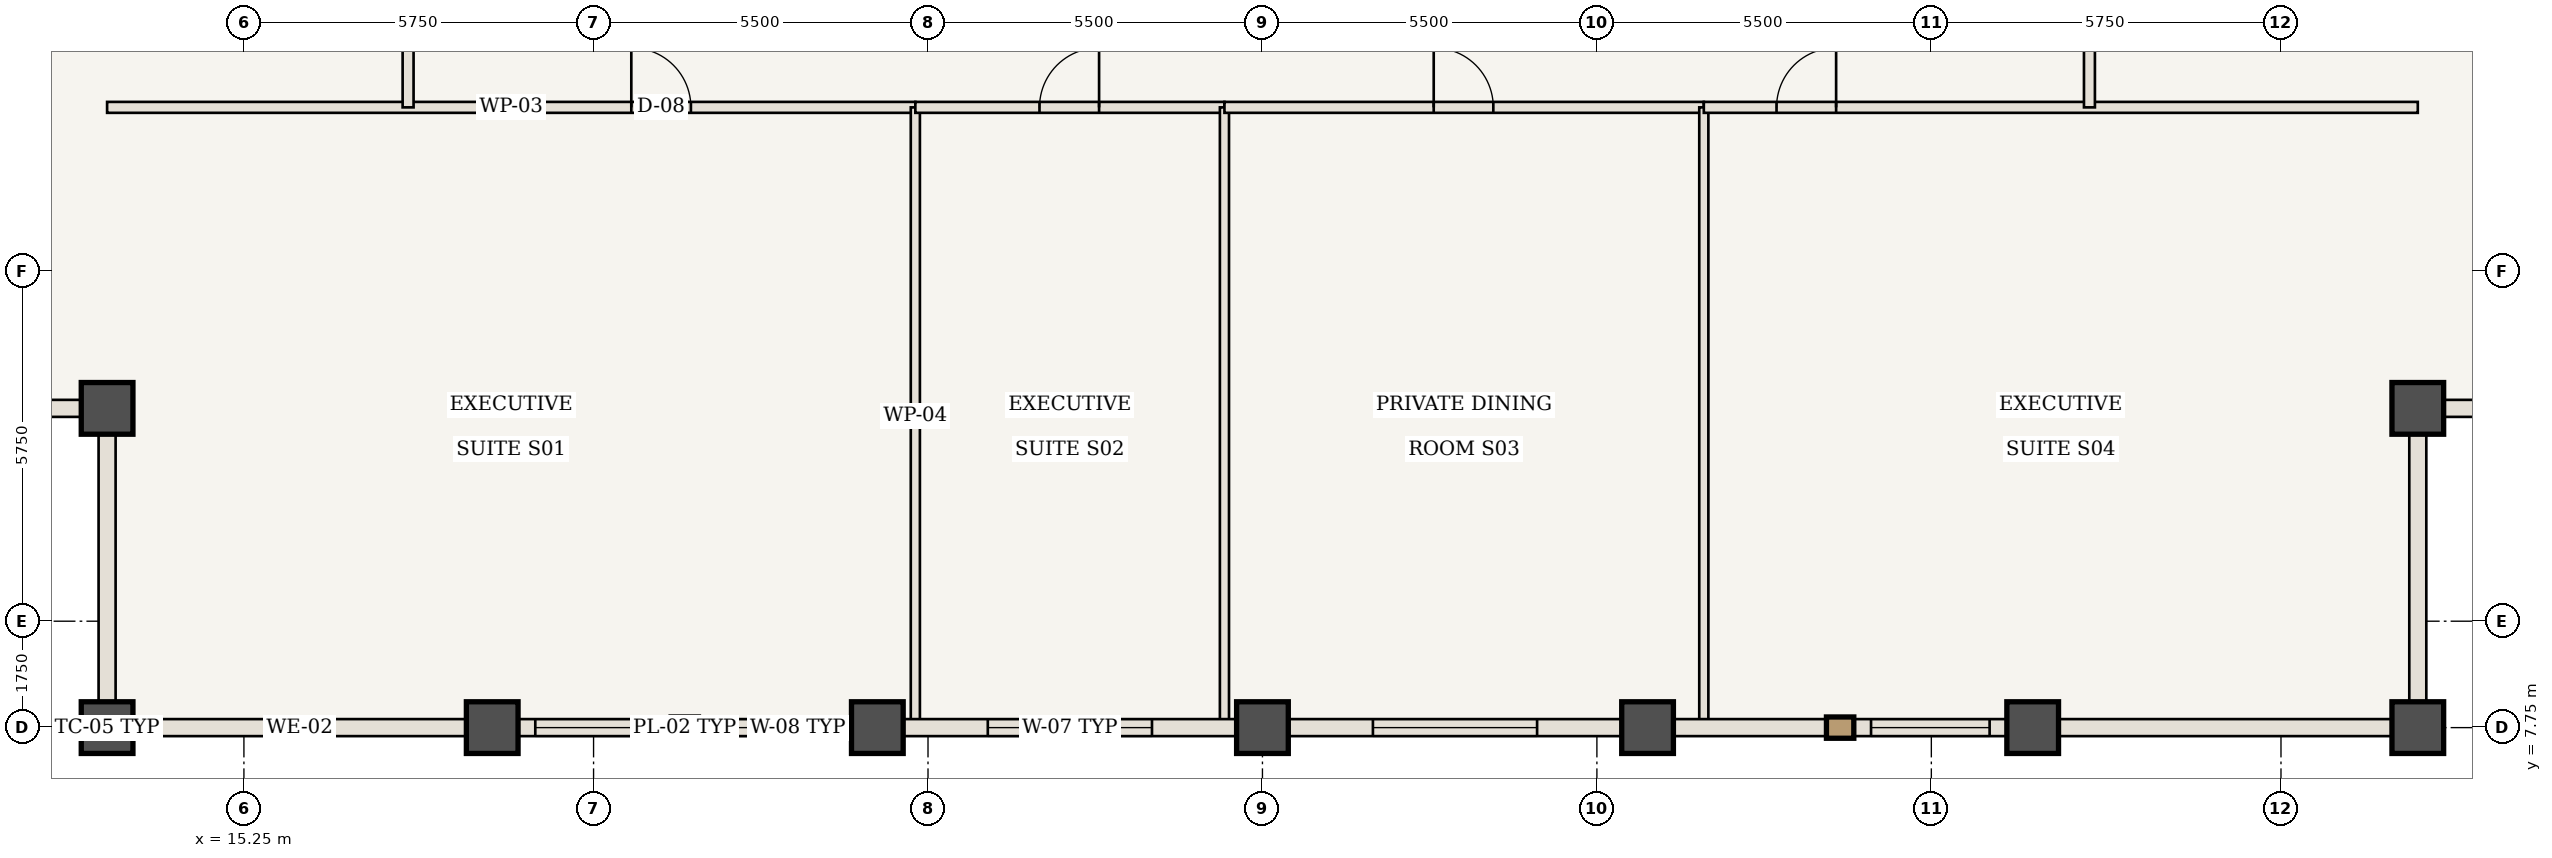
"""IFC4 building model, lengths in metres.
Left out: names, types, materials, properties, quantities, classifications, styles, units other than length and angle.
Written with IfcOpenShell. Run it as: python <this file> out.ifc"""

import sys

from ifc_helpers import new_model, si_unit, direction, frame, frame_2d, origin, origin_2d, place, context, subcontext, project, spatial, rectangle, extrude, element, fill, save


model = new_model("IFC4")
c1 = context("Model", 3, precision=1e-05, world=origin(), true_north=direction((0.0, 1.0)))
c2 = subcontext(c1, "Body", "Model", "MODEL_VIEW")
j1 = project(units=[si_unit("LENGTHUNIT", "METRE"), si_unit("PLANEANGLEUNIT", "RADIAN")], contexts=[c1])
p1 = place(None, origin())
s1 = spatial("IfcSite", under=j1, at=p1, CompositionType="ELEMENT")
p2 = place(p1, origin())
s2 = spatial("IfcBuilding", under=s1, at=p2, CompositionType="ELEMENT")
p3 = place(p2, frame((0.0, 0.0, 221.55)))
s3 = spatial("IfcBuildingStorey", under=s2, at=p3, CompositionType="ELEMENT", Elevation=221.55)
for number, where, z_axis, x_axis in (
    (1, (13.0, 7.75, 0.0), (0.0, 0.0, 1.0), (1.0, 0.0, 0.0)),
    (2, (13.0, 13.0, 0.0), (0.0, 0.0, 1.0), (1.0, 0.0, 0.0)),
    (3, (51.0, 7.75, 0.0), (0.0, 0.0, 1.0), (1.0, 0.0, 0.0)),
    (4, (51.0, 13.0, 0.0), (0.0, 0.0, 1.0), (1.0, 0.0, 0.0)),
    (5, (19.333, 7.75, 0.0), (0.0, 0.0, 1.0), (1.0, 0.0, 0.0)),
    (6, (25.667, 7.75, 0.0), (0.0, 0.0, 1.0), (1.0, 0.0, 0.0)),
    (7, (32.0, 7.75, 0.0), (0.0, 0.0, 1.0), (1.0, 0.0, 0.0)),
    (8, (38.333, 7.75, 0.0), (0.0, 0.0, 1.0), (1.0, 0.0, 0.0)),
    (9, (44.667, 7.75, 0.0), (0.0, 0.0, 1.0), (1.0, 0.0, 0.0)),
):
    element("IfcColumn", number, at=place(p3, frame(where, z_axis=z_axis, x_axis=x_axis)), inside=s3, PredefinedType="COLUMN", context=c2, shape_type="SweptSolid", body=[
        extrude(rectangle(XDim=0.85, YDim=0.85, at=origin_2d()), origin(), (0.0, 0.0, 1.0), 3.85),
    ])
p4 = place(p3, frame((13.0, 17.95, 0.0), z_axis=(0.0, 0.0, 1.0), x_axis=(1.0, 0.0, 0.0)))
e10 = element("IfcWall", 10, at=p4, inside=s3, PredefinedType="STANDARD", context=c2, shape_type="SweptSolid", body=[
    extrude(rectangle(XDim=13.292, YDim=0.18, at=frame_2d((6.646, 0.0))), origin(), (0.0, 0.0, 1.0), 3.685),
])
p5 = place(p4, frame((8.621, 0.0, 0.0)))
e11 = element("IfcOpeningElement", 11, at=p5, cuts=e10, PredefinedType="OPENING", context=c2, shape_type="SweptSolid", body=[
    extrude(rectangle(XDim=0.98, YDim=2.2, at=frame_2d((0.49, 1.1))), frame((0.0, 0.1, 0.0), z_axis=(0.0, -1.0, 0.0), x_axis=(1.0, 0.0, 0.0)), (0.0, 0.0, 1.0), 0.2),
])
p6 = place(p3, frame((26.292, 7.81, 0.0), z_axis=(0.0, 0.0, 1.0), x_axis=(0.0, 1.0, 0.0)))
e12 = element("IfcWall", 12, at=p6, inside=s3, PredefinedType="STANDARD", context=c2, shape_type="SweptSolid", body=[
    extrude(rectangle(XDim=10.14, YDim=0.15, at=frame_2d((5.07, 0.0))), origin(), (0.0, 0.0, 1.0), 3.685),
])
p7 = place(p3, frame((26.292, 17.95, 0.0), z_axis=(0.0, 0.0, 1.0), x_axis=(1.0, 0.0, 0.0)))
e13 = element("IfcWall", 13, at=p7, inside=s3, PredefinedType="STANDARD", context=c2, shape_type="SweptSolid", body=[
    extrude(rectangle(XDim=5.083, YDim=0.18, at=frame_2d((2.542, 0.0))), origin(), (0.0, 0.0, 1.0), 3.685),
])
p8 = place(p7, frame((2.042, 0.0, 0.0)))
e14 = element("IfcOpeningElement", 14, at=p8, cuts=e13, PredefinedType="OPENING", context=c2, shape_type="SweptSolid", body=[
    extrude(rectangle(XDim=0.98, YDim=2.2, at=frame_2d((0.49, 1.1))), frame((0.0, 0.1, 0.0), z_axis=(0.0, -1.0, 0.0), x_axis=(1.0, 0.0, 0.0)), (0.0, 0.0, 1.0), 0.2),
])
p9 = place(p3, frame((31.375, 7.81, 0.0), z_axis=(0.0, 0.0, 1.0), x_axis=(0.0, 1.0, 0.0)))
e15 = element("IfcWall", 15, at=p9, inside=s3, PredefinedType="STANDARD", context=c2, shape_type="SweptSolid", body=[
    extrude(rectangle(XDim=10.14, YDim=0.15, at=frame_2d((5.07, 0.0))), origin(), (0.0, 0.0, 1.0), 3.685),
])
p10 = place(p3, frame((31.375, 17.95, 0.0), z_axis=(0.0, 0.0, 1.0), x_axis=(1.0, 0.0, 0.0)))
e16 = element("IfcWall", 16, at=p10, inside=s3, PredefinedType="STANDARD", context=c2, shape_type="SweptSolid", body=[
    extrude(rectangle(XDim=7.883, YDim=0.18, at=frame_2d((3.942, 0.0))), origin(), (0.0, 0.0, 1.0), 3.685),
])
p11 = place(p10, frame((3.442, 0.0, 0.0)))
e17 = element("IfcOpeningElement", 17, at=p11, cuts=e16, PredefinedType="OPENING", context=c2, shape_type="SweptSolid", body=[
    extrude(rectangle(XDim=0.98, YDim=2.2, at=frame_2d((0.49, 1.1))), frame((0.0, 0.1, 0.0), z_axis=(0.0, -1.0, 0.0), x_axis=(1.0, 0.0, 0.0)), (0.0, 0.0, 1.0), 0.2),
])
p12 = place(p3, frame((39.258, 7.81, 0.0), z_axis=(0.0, 0.0, 1.0), x_axis=(0.0, 1.0, 0.0)))
e18 = element("IfcWall", 18, at=p12, inside=s3, PredefinedType="STANDARD", context=c2, shape_type="SweptSolid", body=[
    extrude(rectangle(XDim=10.14, YDim=0.15, at=frame_2d((5.07, 0.0))), origin(), (0.0, 0.0, 1.0), 3.685),
])
p13 = place(p3, frame((39.258, 17.95, 0.0), z_axis=(0.0, 0.0, 1.0), x_axis=(1.0, 0.0, 0.0)))
e19 = element("IfcWall", 19, at=p13, inside=s3, PredefinedType="STANDARD", context=c2, shape_type="SweptSolid", body=[
    extrude(rectangle(XDim=11.742, YDim=0.18, at=frame_2d((5.871, 0.0))), origin(), (0.0, 0.0, 1.0), 3.685),
])
p14 = place(p13, frame((1.196, 0.0, 0.0)))
e20 = element("IfcOpeningElement", 20, at=p14, cuts=e19, PredefinedType="OPENING", context=c2, shape_type="SweptSolid", body=[
    extrude(rectangle(XDim=0.98, YDim=2.2, at=frame_2d((0.49, 1.1))), frame((0.0, 0.1, 0.0), z_axis=(0.0, -1.0, 0.0), x_axis=(1.0, 0.0, 0.0)), (0.0, 0.0, 1.0), 0.2),
])
p15 = place(p3, frame((17.95, 17.95, 0.0), z_axis=(0.0, 0.0, 1.0), x_axis=(0.0, 1.0, 0.0)))
e21 = element("IfcWall", 21, at=p15, inside=s3, PredefinedType="STANDARD", context=c2, shape_type="SweptSolid", body=[
    extrude(rectangle(XDim=6.642, YDim=0.18, at=frame_2d((3.321, 0.0))), origin(), (0.0, 0.0, 1.0), 3.685),
])
p16 = place(p15, frame((4.271, 0.0, 0.0)))
e22 = element("IfcOpeningElement", 22, at=p16, cuts=e21, PredefinedType="OPENING", context=c2, shape_type="SweptSolid", body=[
    extrude(rectangle(XDim=0.98, YDim=2.2, at=frame_2d((0.49, 1.1))), frame((0.0, 0.1, 0.0), z_axis=(0.0, -1.0, 0.0), x_axis=(1.0, 0.0, 0.0)), (0.0, 0.0, 1.0), 0.2),
])
p17 = place(p3, frame((45.6, 17.95, 0.0), z_axis=(0.0, 0.0, 1.0), x_axis=(0.0, 1.0, 0.0)))
e23 = element("IfcWall", 23, at=p17, inside=s3, PredefinedType="STANDARD", context=c2, shape_type="SweptSolid", body=[
    extrude(rectangle(XDim=13.1, YDim=0.18, at=frame_2d((6.55, 0.0))), origin(), (0.0, 0.0, 1.0), 3.685),
])
p18 = place(p17, frame((6.05, 0.0, 0.0)))
e24 = element("IfcOpeningElement", 24, at=p18, cuts=e23, PredefinedType="OPENING", context=c2, shape_type="SweptSolid", body=[
    extrude(rectangle(XDim=0.98, YDim=2.2, at=frame_2d((0.49, 1.1))), frame((0.0, 0.1, 0.0), z_axis=(0.0, -1.0, 0.0), x_axis=(1.0, 0.0, 0.0)), (0.0, 0.0, 1.0), 0.2),
])
p19 = place(p3, frame((19.333, 7.75, 0.0), z_axis=(0.0, 0.0, 1.0), x_axis=(-1.0, 0.0, 0.0)))
e25 = element("IfcWall", 25, at=p19, inside=s3, PredefinedType="USERDEFINED", context=c2, shape_type="SweptSolid", body=[
    extrude(rectangle(XDim=6.333, YDim=0.28, at=frame_2d((3.167, 0.0))), origin(), (0.0, 0.0, 1.0), 2.985),
])
p20 = place(p3, frame((25.667, 7.75, 0.0), z_axis=(0.0, 0.0, 1.0), x_axis=(-1.0, 0.0, 0.0)))
e26 = element("IfcWall", 26, at=p20, inside=s3, PredefinedType="USERDEFINED", context=c2, shape_type="SweptSolid", body=[
    extrude(rectangle(XDim=6.333, YDim=0.28, at=frame_2d((3.167, 0.0))), origin(), (0.0, 0.0, 1.0), 2.985),
])
p21 = place(p20, frame((0.708, 0.0, 0.85)))
e27 = element("IfcOpeningElement", 27, at=p21, cuts=e26, PredefinedType="OPENING", context=c2, shape_type="SweptSolid", body=[
    extrude(rectangle(XDim=1.95, YDim=1.935, at=frame_2d((0.975, 0.968))), frame((0.0, 0.15, 0.0), z_axis=(0.0, -1.0, 0.0), x_axis=(1.0, 0.0, 0.0)), (0.0, 0.0, 1.0), 0.3),
])
p22 = place(p20, frame((3.675, 0.0, 0.85)))
e28 = element("IfcOpeningElement", 28, at=p22, cuts=e26, PredefinedType="OPENING", context=c2, shape_type="SweptSolid", body=[
    extrude(rectangle(XDim=1.95, YDim=1.935, at=frame_2d((0.975, 0.968))), frame((0.0, 0.15, 0.0), z_axis=(0.0, -1.0, 0.0), x_axis=(1.0, 0.0, 0.0)), (0.0, 0.0, 1.0), 0.3),
])
p23 = place(p3, frame((32.0, 7.75, 0.0), z_axis=(0.0, 0.0, 1.0), x_axis=(-1.0, 0.0, 0.0)))
e29 = element("IfcWall", 29, at=p23, inside=s3, PredefinedType="USERDEFINED", context=c2, shape_type="SweptSolid", body=[
    extrude(rectangle(XDim=6.333, YDim=0.28, at=frame_2d((3.167, 0.0))), origin(), (0.0, 0.0, 1.0), 2.985),
])
p24 = place(p23, frame((1.817, 0.0, 0.85)))
e30 = element("IfcOpeningElement", 30, at=p24, cuts=e29, PredefinedType="OPENING", context=c2, shape_type="SweptSolid", body=[
    extrude(rectangle(XDim=2.7, YDim=1.935, at=frame_2d((1.35, 0.968))), frame((0.0, 0.15, 0.0), z_axis=(0.0, -1.0, 0.0), x_axis=(1.0, 0.0, 0.0)), (0.0, 0.0, 1.0), 0.3),
])
p25 = place(p3, frame((38.333, 7.75, 0.0), z_axis=(0.0, 0.0, 1.0), x_axis=(-1.0, 0.0, 0.0)))
e31 = element("IfcWall", 31, at=p25, inside=s3, PredefinedType="USERDEFINED", context=c2, shape_type="SweptSolid", body=[
    extrude(rectangle(XDim=6.333, YDim=0.28, at=frame_2d((3.167, 0.0))), origin(), (0.0, 0.0, 1.0), 2.985),
])
p26 = place(p25, frame((1.817, 0.0, 0.85)))
e32 = element("IfcOpeningElement", 32, at=p26, cuts=e31, PredefinedType="OPENING", context=c2, shape_type="SweptSolid", body=[
    extrude(rectangle(XDim=2.7, YDim=1.935, at=frame_2d((1.35, 0.968))), frame((0.0, 0.15, 0.0), z_axis=(0.0, -1.0, 0.0), x_axis=(1.0, 0.0, 0.0)), (0.0, 0.0, 1.0), 0.3),
])
p27 = place(p3, frame((44.667, 7.75, 0.0), z_axis=(0.0, 0.0, 1.0), x_axis=(-1.0, 0.0, 0.0)))
e33 = element("IfcWall", 33, at=p27, inside=s3, PredefinedType="USERDEFINED", context=c2, shape_type="SweptSolid", body=[
    extrude(rectangle(XDim=6.333, YDim=0.28, at=frame_2d((3.167, 0.0))), origin(), (0.0, 0.0, 1.0), 2.985),
])
p28 = place(p27, frame((0.708, 0.0, 0.85)))
e34 = element("IfcOpeningElement", 34, at=p28, cuts=e33, PredefinedType="OPENING", context=c2, shape_type="SweptSolid", body=[
    extrude(rectangle(XDim=1.95, YDim=1.935, at=frame_2d((0.975, 0.968))), frame((0.0, 0.15, 0.0), z_axis=(0.0, -1.0, 0.0), x_axis=(1.0, 0.0, 0.0)), (0.0, 0.0, 1.0), 0.3),
])
p29 = place(p3, frame((51.0, 7.75, 0.0), z_axis=(0.0, 0.0, 1.0), x_axis=(-1.0, 0.0, 0.0)))
e35 = element("IfcWall", 35, at=p29, inside=s3, PredefinedType="USERDEFINED", context=c2, shape_type="SweptSolid", body=[
    extrude(rectangle(XDim=6.333, YDim=0.28, at=frame_2d((3.167, 0.0))), origin(), (0.0, 0.0, 1.0), 2.985),
])
for number, where, z_axis, x_axis in (
    (36, (13.0, 7.75, 0.0), (0.0, 0.0, 1.0), (0.0, 1.0, 0.0)),
    (37, (13.0, 13.0, 0.0), (0.0, 0.0, 1.0), (-1.0, 0.0, 0.0)),
    (38, (51.0, 13.0, 0.0), (0.0, 0.0, 1.0), (0.0, -1.0, 0.0)),
    (39, (56.25, 13.0, 0.0), (0.0, 0.0, 1.0), (-1.0, 0.0, 0.0)),
):
    element("IfcWall", number, at=place(p3, frame(where, z_axis=z_axis, x_axis=x_axis)), inside=s3, PredefinedType="USERDEFINED", context=c2, shape_type="SweptSolid", body=[
        extrude(rectangle(XDim=5.25, YDim=0.28, at=frame_2d((2.625, 0.0))), origin(), (0.0, 0.0, 1.0), 2.985),
    ])
p30 = place(p5, origin())
e40 = element("IfcDoor", 40, at=p30, inside=s3, OperationType="SINGLE_SWING_LEFT", PredefinedType="DOOR", context=c2, shape_type="SweptSolid", body=[
    extrude(rectangle(XDim=0.98, YDim=2.2, at=frame_2d((0.49, 1.1))), frame((0.0, 0.025, 0.0), z_axis=(0.0, -1.0, 0.0), x_axis=(1.0, 0.0, 0.0)), (0.0, 0.0, 1.0), 0.05),
])
fill(e11, e40)
p31 = place(p8, origin())
e41 = element("IfcDoor", 41, at=p31, inside=s3, OperationType="SINGLE_SWING_RIGHT", PredefinedType="DOOR", context=c2, shape_type="SweptSolid", body=[
    extrude(rectangle(XDim=0.98, YDim=2.2, at=frame_2d((0.49, 1.1))), frame((0.0, 0.025, 0.0), z_axis=(0.0, -1.0, 0.0), x_axis=(1.0, 0.0, 0.0)), (0.0, 0.0, 1.0), 0.05),
])
fill(e14, e41)
p32 = place(p11, origin())
e42 = element("IfcDoor", 42, at=p32, inside=s3, OperationType="SINGLE_SWING_LEFT", PredefinedType="DOOR", context=c2, shape_type="SweptSolid", body=[
    extrude(rectangle(XDim=0.98, YDim=2.2, at=frame_2d((0.49, 1.1))), frame((0.0, 0.025, 0.0), z_axis=(0.0, -1.0, 0.0), x_axis=(1.0, 0.0, 0.0)), (0.0, 0.0, 1.0), 0.05),
])
fill(e17, e42)
p33 = place(p14, origin())
e43 = element("IfcDoor", 43, at=p33, inside=s3, OperationType="SINGLE_SWING_RIGHT", PredefinedType="DOOR", context=c2, shape_type="SweptSolid", body=[
    extrude(rectangle(XDim=0.98, YDim=2.2, at=frame_2d((0.49, 1.1))), frame((0.0, 0.025, 0.0), z_axis=(0.0, -1.0, 0.0), x_axis=(1.0, 0.0, 0.0)), (0.0, 0.0, 1.0), 0.05),
])
fill(e20, e43)
p34 = place(p21, origin())
e44 = element("IfcWindow", 44, at=p34, inside=s3, PartitioningType="SINGLE_PANEL", PredefinedType="WINDOW", context=c2, shape_type="SweptSolid", body=[
    extrude(rectangle(XDim=1.95, YDim=1.935, at=frame_2d((0.975, 0.968))), frame((0.0, 0.03, 0.0), z_axis=(0.0, -1.0, 0.0), x_axis=(1.0, 0.0, 0.0)), (0.0, 0.0, 1.0), 0.06),
])
fill(e27, e44)
p35 = place(p22, origin())
e45 = element("IfcWindow", 45, at=p35, inside=s3, PartitioningType="SINGLE_PANEL", PredefinedType="WINDOW", context=c2, shape_type="SweptSolid", body=[
    extrude(rectangle(XDim=1.95, YDim=1.935, at=frame_2d((0.975, 0.968))), frame((0.0, 0.03, 0.0), z_axis=(0.0, -1.0, 0.0), x_axis=(1.0, 0.0, 0.0)), (0.0, 0.0, 1.0), 0.06),
])
fill(e28, e45)
p36 = place(p24, origin())
e46 = element("IfcWindow", 46, at=p36, inside=s3, PartitioningType="SINGLE_PANEL", PredefinedType="WINDOW", context=c2, shape_type="SweptSolid", body=[
    extrude(rectangle(XDim=2.7, YDim=1.935, at=frame_2d((1.35, 0.968))), frame((0.0, 0.03, 0.0), z_axis=(0.0, -1.0, 0.0), x_axis=(1.0, 0.0, 0.0)), (0.0, 0.0, 1.0), 0.06),
])
fill(e30, e46)
p37 = place(p26, origin())
e47 = element("IfcWindow", 47, at=p37, inside=s3, PartitioningType="SINGLE_PANEL", PredefinedType="WINDOW", context=c2, shape_type="SweptSolid", body=[
    extrude(rectangle(XDim=2.7, YDim=1.935, at=frame_2d((1.35, 0.968))), frame((0.0, 0.03, 0.0), z_axis=(0.0, -1.0, 0.0), x_axis=(1.0, 0.0, 0.0)), (0.0, 0.0, 1.0), 0.06),
])
fill(e32, e47)
p38 = place(p28, origin())
e48 = element("IfcWindow", 48, at=p38, inside=s3, PartitioningType="SINGLE_PANEL", PredefinedType="WINDOW", context=c2, shape_type="SweptSolid", body=[
    extrude(rectangle(XDim=1.95, YDim=1.935, at=frame_2d((0.975, 0.968))), frame((0.0, 0.03, 0.0), z_axis=(0.0, -1.0, 0.0), x_axis=(1.0, 0.0, 0.0)), (0.0, 0.0, 1.0), 0.06),
])
fill(e34, e48)
save(model, sys.argv[1])
